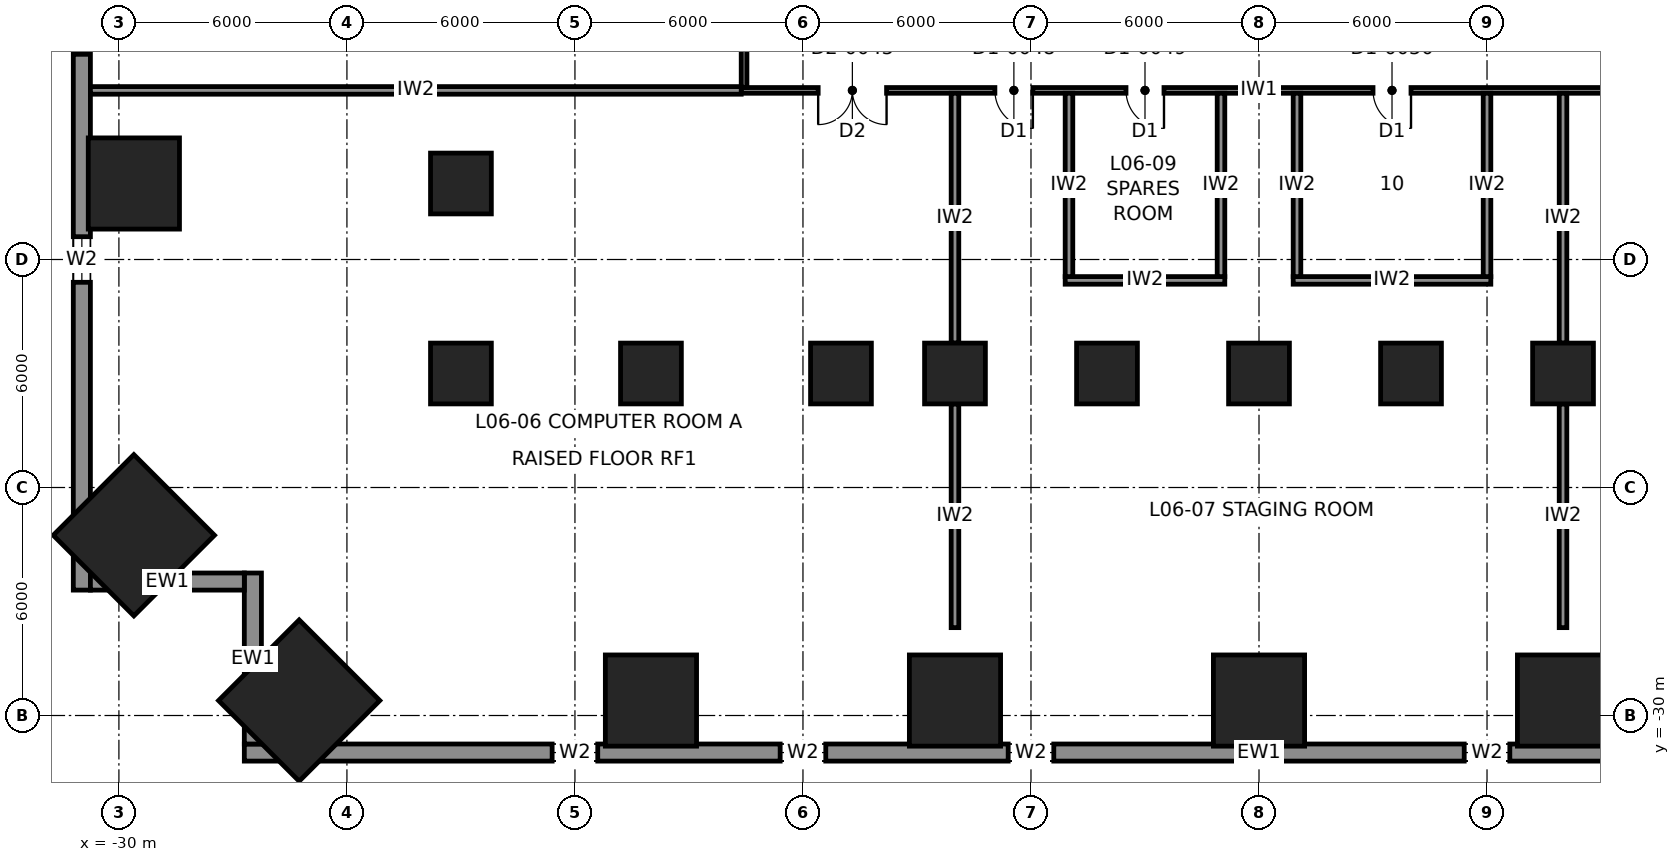
"""IFC4 building model, lengths in metres.
Left out: names, types, materials, properties, quantities, classifications, styles, units other than length and angle.
Written with IfcOpenShell. Run it as: python <this file> out.ifc"""

import sys

from ifc_helpers import new_model, si_unit, direction, frame, frame_2d, origin, origin_2d, place, context, subcontext, project, spatial, rectangle, extrude, element, fill, save


model = new_model("IFC4")
c1 = context("Model", 3, precision=1e-05, world=origin(), true_north=direction((0.0, 1.0)))
c2 = subcontext(c1, "Body", "Model", "MODEL_VIEW")
j1 = project(units=[si_unit("LENGTHUNIT", "METRE"), si_unit("PLANEANGLEUNIT", "RADIAN")], contexts=[c1])
p1 = place(None, origin())
s1 = spatial("IfcSite", under=j1, at=p1, CompositionType="ELEMENT")
p2 = place(p1, origin())
s2 = spatial("IfcBuilding", under=s1, at=p2, CompositionType="ELEMENT")
p3 = place(p2, frame((0.0, 0.0, 32.0)))
s3 = spatial("IfcBuildingStorey", under=s2, at=p3, CompositionType="ELEMENT", Elevation=32.0)
for number, where, z_axis, x_axis in (
    (1, (-25.256, -29.606, 0.0), (0.04, 0.04, 0.998), (-0.707, 0.707, 0.0)),
    (2, (-29.606, -25.256, 0.0), (0.04, 0.04, 0.998), (-0.707, 0.707, 0.0)),
):
    element("IfcColumn", number, at=place(p3, frame(where, z_axis=z_axis, x_axis=x_axis)), inside=s3, PredefinedType="COLUMN", context=c2, shape_type="SweptSolid", body=[
        extrude(rectangle(XDim=3.0, YDim=3.0, at=origin_2d()), origin(), (0.0, 0.0, 1.0), 5.509),
    ])
for number, where, z_axis, x_axis in (
    (3, (0.0, -29.606, 0.0), (0.0, 0.04, 0.999), (-1.0, 0.0, 0.0)),
    (4, (-8.0, -29.606, 0.0), (0.0, 0.04, 0.999), (-1.0, 0.0, 0.0)),
    (5, (8.0, -29.606, 0.0), (0.0, 0.04, 0.999), (-1.0, 0.0, 0.0)),
    (6, (-16.0, -29.606, 0.0), (0.0, 0.04, 0.999), (-1.0, 0.0, 0.0)),
    (7, (-29.606, -16.0, 0.0), (0.04, 0.0, 0.999), (0.0, 1.0, 0.0)),
):
    element("IfcColumn", number, at=place(p3, frame(where, z_axis=z_axis, x_axis=x_axis)), inside=s3, PredefinedType="COLUMN", context=c2, shape_type="SweptSolid", body=[
        extrude(rectangle(XDim=2.4, YDim=2.4, at=origin_2d()), origin(), (0.0, 0.0, 1.0), 5.504),
    ])
for number, where, z_axis, x_axis in (
    (8, (0.0, -21.0, 0.0), (0.0, 0.0, 1.0), (1.0, 0.0, 0.0)),
    (9, (-4.0, -21.0, 0.0), (0.0, 0.0, 1.0), (1.0, 0.0, 0.0)),
    (10, (4.0, -21.0, 0.0), (0.0, 0.0, 1.0), (1.0, 0.0, 0.0)),
    (11, (-8.0, -21.0, 0.0), (0.0, 0.0, 1.0), (1.0, 0.0, 0.0)),
    (12, (8.0, -21.0, 0.0), (0.0, 0.0, 1.0), (1.0, 0.0, 0.0)),
    (13, (-11.0, -21.0, 0.0), (0.0, 0.0, 1.0), (1.0, 0.0, 0.0)),
    (14, (-16.0, -21.0, 0.0), (0.0, 0.0, 1.0), (1.0, 0.0, 0.0)),
    (15, (-21.0, -16.0, 0.0), (0.0, 0.0, 1.0), (1.0, 0.0, 0.0)),
    (16, (-21.0, -21.0, 0.0), (0.0, 0.0, 1.0), (1.0, 0.0, 0.0)),
):
    element("IfcColumn", number, at=place(p3, frame(where, z_axis=z_axis, x_axis=x_axis)), inside=s3, PredefinedType="COLUMN", context=c2, shape_type="SweptSolid", body=[
        extrude(rectangle(XDim=1.6, YDim=1.6, at=origin_2d()), origin(), (0.0, 0.0, 1.0), 5.5),
    ])
p4 = place(p3, frame((-26.7, -30.975, 0.0), z_axis=(0.0, 0.0, 1.0), x_axis=(1.0, 0.0, 0.0)))
e17 = element("IfcWall", 17, at=p4, inside=s3, PredefinedType="SOLIDWALL", context=c2, shape_type="SweptSolid", body=[
    extrude(rectangle(XDim=53.4, YDim=0.45, at=frame_2d((26.7, 0.0))), origin(), (0.0, 0.0, 1.0), 5.3),
])
p5 = place(p4, frame((8.1, 0.0, 0.9)))
e18 = element("IfcOpeningElement", 18, at=p5, cuts=e17, PredefinedType="OPENING", context=c2, shape_type="SweptSolid", body=[
    extrude(rectangle(XDim=1.2, YDim=2.0, at=frame_2d((0.6, 1.0))), frame((0.0, 0.235, 0.0), z_axis=(0.0, -1.0, 0.0), x_axis=(1.0, 0.0, 0.0)), (0.0, 0.0, 1.0), 0.47),
])
p6 = place(p4, frame((14.1, 0.0, 0.9)))
e19 = element("IfcOpeningElement", 19, at=p6, cuts=e17, PredefinedType="OPENING", context=c2, shape_type="SweptSolid", body=[
    extrude(rectangle(XDim=1.2, YDim=2.0, at=frame_2d((0.6, 1.0))), frame((0.0, 0.235, 0.0), z_axis=(0.0, -1.0, 0.0), x_axis=(1.0, 0.0, 0.0)), (0.0, 0.0, 1.0), 0.47),
])
p7 = place(p4, frame((20.1, 0.0, 0.9)))
e20 = element("IfcOpeningElement", 20, at=p7, cuts=e17, PredefinedType="OPENING", context=c2, shape_type="SweptSolid", body=[
    extrude(rectangle(XDim=1.2, YDim=2.0, at=frame_2d((0.6, 1.0))), frame((0.0, 0.235, 0.0), z_axis=(0.0, -1.0, 0.0), x_axis=(1.0, 0.0, 0.0)), (0.0, 0.0, 1.0), 0.47),
])
p8 = place(p4, frame((32.1, 0.0, 0.9)))
e21 = element("IfcOpeningElement", 21, at=p8, cuts=e17, PredefinedType="OPENING", context=c2, shape_type="SweptSolid", body=[
    extrude(rectangle(XDim=1.2, YDim=2.0, at=frame_2d((0.6, 1.0))), frame((0.0, 0.235, 0.0), z_axis=(0.0, -1.0, 0.0), x_axis=(1.0, 0.0, 0.0)), (0.0, 0.0, 1.0), 0.47),
])
p9 = place(p4, frame((38.1, 0.0, 0.9)))
e22 = element("IfcOpeningElement", 22, at=p9, cuts=e17, PredefinedType="OPENING", context=c2, shape_type="SweptSolid", body=[
    extrude(rectangle(XDim=1.2, YDim=2.0, at=frame_2d((0.6, 1.0))), frame((0.0, 0.235, 0.0), z_axis=(0.0, -1.0, 0.0), x_axis=(1.0, 0.0, 0.0)), (0.0, 0.0, 1.0), 0.47),
])
p10 = place(p4, frame((44.1, 0.0, 0.9)))
e23 = element("IfcOpeningElement", 23, at=p10, cuts=e17, PredefinedType="OPENING", context=c2, shape_type="SweptSolid", body=[
    extrude(rectangle(XDim=1.2, YDim=2.0, at=frame_2d((0.6, 1.0))), frame((0.0, 0.235, 0.0), z_axis=(0.0, -1.0, 0.0), x_axis=(1.0, 0.0, 0.0)), (0.0, 0.0, 1.0), 0.47),
])
p11 = place(p3, frame((-30.975, 26.7, 0.0), z_axis=(0.0, 0.0, 1.0), x_axis=(0.0, -1.0, 0.0)))
e24 = element("IfcWall", 24, at=p11, inside=s3, PredefinedType="SOLIDWALL", context=c2, shape_type="SweptSolid", body=[
    extrude(rectangle(XDim=53.4, YDim=0.45, at=frame_2d((26.7, 0.0))), origin(), (0.0, 0.0, 1.0), 5.3),
])
p12 = place(p11, frame((8.1, 0.0, 0.9)))
e25 = element("IfcOpeningElement", 25, at=p12, cuts=e24, PredefinedType="OPENING", context=c2, shape_type="SweptSolid", body=[
    extrude(rectangle(XDim=1.2, YDim=2.0, at=frame_2d((0.6, 1.0))), frame((0.0, 0.235, 0.0), z_axis=(0.0, -1.0, 0.0), x_axis=(1.0, 0.0, 0.0)), (0.0, 0.0, 1.0), 0.47),
])
p13 = place(p11, frame((14.1, 0.0, 0.9)))
e26 = element("IfcOpeningElement", 26, at=p13, cuts=e24, PredefinedType="OPENING", context=c2, shape_type="SweptSolid", body=[
    extrude(rectangle(XDim=1.2, YDim=2.0, at=frame_2d((0.6, 1.0))), frame((0.0, 0.235, 0.0), z_axis=(0.0, -1.0, 0.0), x_axis=(1.0, 0.0, 0.0)), (0.0, 0.0, 1.0), 0.47),
])
p14 = place(p11, frame((20.1, 0.0, 0.9)))
e27 = element("IfcOpeningElement", 27, at=p14, cuts=e24, PredefinedType="OPENING", context=c2, shape_type="SweptSolid", body=[
    extrude(rectangle(XDim=1.2, YDim=2.0, at=frame_2d((0.6, 1.0))), frame((0.0, 0.235, 0.0), z_axis=(0.0, -1.0, 0.0), x_axis=(1.0, 0.0, 0.0)), (0.0, 0.0, 1.0), 0.47),
])
p15 = place(p11, frame((32.1, 0.0, 0.9)))
e28 = element("IfcOpeningElement", 28, at=p15, cuts=e24, PredefinedType="OPENING", context=c2, shape_type="SweptSolid", body=[
    extrude(rectangle(XDim=1.2, YDim=2.0, at=frame_2d((0.6, 1.0))), frame((0.0, 0.235, 0.0), z_axis=(0.0, -1.0, 0.0), x_axis=(1.0, 0.0, 0.0)), (0.0, 0.0, 1.0), 0.47),
])
p16 = place(p11, frame((38.1, 0.0, 0.9)))
e29 = element("IfcOpeningElement", 29, at=p16, cuts=e24, PredefinedType="OPENING", context=c2, shape_type="SweptSolid", body=[
    extrude(rectangle(XDim=1.2, YDim=2.0, at=frame_2d((0.6, 1.0))), frame((0.0, 0.235, 0.0), z_axis=(0.0, -1.0, 0.0), x_axis=(1.0, 0.0, 0.0)), (0.0, 0.0, 1.0), 0.47),
])
p17 = place(p11, frame((44.1, 0.0, 0.9)))
e30 = element("IfcOpeningElement", 30, at=p17, cuts=e24, PredefinedType="OPENING", context=c2, shape_type="SweptSolid", body=[
    extrude(rectangle(XDim=1.2, YDim=2.0, at=frame_2d((0.6, 1.0))), frame((0.0, 0.235, 0.0), z_axis=(0.0, -1.0, 0.0), x_axis=(1.0, 0.0, 0.0)), (0.0, 0.0, 1.0), 0.47),
])
p18 = place(p3, frame((-26.475, -26.25, 0.0), z_axis=(0.0, 0.0, 1.0), x_axis=(0.0, -1.0, 0.0)))
e31 = element("IfcWall", 31, at=p18, inside=s3, PredefinedType="SOLIDWALL", context=c2, shape_type="SweptSolid", body=[
    extrude(rectangle(XDim=4.5, YDim=0.45, at=frame_2d((2.25, 0.0))), origin(), (0.0, 0.0, 1.0), 5.3),
])
p19 = place(p3, frame((-26.7, -26.475, 0.0), z_axis=(0.0, 0.0, 1.0), x_axis=(-1.0, 0.0, 0.0)))
e32 = element("IfcWall", 32, at=p19, inside=s3, PredefinedType="SOLIDWALL", context=c2, shape_type="SweptSolid", body=[
    extrude(rectangle(XDim=4.05, YDim=0.45, at=frame_2d((2.025, 0.0))), origin(), (0.0, 0.0, 1.0), 5.3),
])
p20 = place(p3, frame((13.625, -13.55, 0.0), z_axis=(0.0, 0.0, 1.0), x_axis=(-1.0, 0.0, 0.0)))
e33 = element("IfcWall", 33, at=p20, inside=s3, PredefinedType="PARTITIONING", context=c2, shape_type="SweptSolid", body=[
    extrude(rectangle(XDim=27.25, YDim=0.15, at=frame_2d((13.625, 0.0))), origin(), (0.0, 0.0, 1.0), 5.3),
])
p21 = place(p20, frame((23.425, 0.0, 0.0)))
e34 = element("IfcOpeningElement", 34, at=p21, cuts=e33, PredefinedType="OPENING", context=c2, shape_type="SweptSolid", body=[
    extrude(rectangle(XDim=1.8, YDim=2.3, at=frame_2d((0.9, 1.15))), frame((0.0, 0.085, 0.0), z_axis=(0.0, -1.0, 0.0), x_axis=(1.0, 0.0, 0.0)), (0.0, 0.0, 1.0), 0.17),
])
p22 = place(p20, frame((19.575, 0.0, 0.0)))
e35 = element("IfcOpeningElement", 35, at=p22, cuts=e33, PredefinedType="OPENING", context=c2, shape_type="SweptSolid", body=[
    extrude(rectangle(XDim=1.0, YDim=2.3, at=frame_2d((0.5, 1.15))), frame((0.0, 0.085, 0.0), z_axis=(0.0, -1.0, 0.0), x_axis=(1.0, 0.0, 0.0)), (0.0, 0.0, 1.0), 0.17),
])
p23 = place(p20, frame((2.025, 0.0, 0.0)))
e36 = element("IfcOpeningElement", 36, at=p23, cuts=e33, PredefinedType="OPENING", context=c2, shape_type="SweptSolid", body=[
    extrude(rectangle(XDim=1.8, YDim=2.3, at=frame_2d((0.9, 1.15))), frame((0.0, 0.085, 0.0), z_axis=(0.0, -1.0, 0.0), x_axis=(1.0, 0.0, 0.0)), (0.0, 0.0, 1.0), 0.17),
])
p24 = place(p20, frame((16.125, 0.0, 0.0)))
e37 = element("IfcOpeningElement", 37, at=p24, cuts=e33, PredefinedType="OPENING", context=c2, shape_type="SweptSolid", body=[
    extrude(rectangle(XDim=1.0, YDim=2.3, at=frame_2d((0.5, 1.15))), frame((0.0, 0.085, 0.0), z_axis=(0.0, -1.0, 0.0), x_axis=(1.0, 0.0, 0.0)), (0.0, 0.0, 1.0), 0.17),
])
p25 = place(p20, frame((9.625, 0.0, 0.0)))
e38 = element("IfcOpeningElement", 38, at=p25, cuts=e33, PredefinedType="OPENING", context=c2, shape_type="SweptSolid", body=[
    extrude(rectangle(XDim=1.0, YDim=2.3, at=frame_2d((0.5, 1.15))), frame((0.0, 0.085, 0.0), z_axis=(0.0, -1.0, 0.0), x_axis=(1.0, 0.0, 0.0)), (0.0, 0.0, 1.0), 0.17),
])
p26 = place(p3, frame((-13.55, 13.475, 0.0), z_axis=(0.0, 0.0, 1.0), x_axis=(0.0, -1.0, 0.0)))
e39 = element("IfcWall", 39, at=p26, inside=s3, PredefinedType="PARTITIONING", context=c2, shape_type="SweptSolid", body=[
    extrude(rectangle(XDim=26.95, YDim=0.15, at=frame_2d((13.475, 0.0))), origin(), (0.0, 0.0, 1.0), 5.3),
])
p27 = place(p26, frame((19.675, 0.0, 0.0)))
e40 = element("IfcOpeningElement", 40, at=p27, cuts=e39, PredefinedType="OPENING", context=c2, shape_type="SweptSolid", body=[
    extrude(rectangle(XDim=1.0, YDim=2.3, at=frame_2d((0.5, 1.15))), frame((0.0, 0.085, 0.0), z_axis=(0.0, -1.0, 0.0), x_axis=(1.0, 0.0, 0.0)), (0.0, 0.0, 1.0), 0.17),
])
p28 = place(p26, frame((8.525, 0.0, 0.0)))
e41 = element("IfcOpeningElement", 41, at=p28, cuts=e39, PredefinedType="OPENING", context=c2, shape_type="SweptSolid", body=[
    extrude(rectangle(XDim=1.8, YDim=2.3, at=frame_2d((0.9, 1.15))), frame((0.0, 0.085, 0.0), z_axis=(0.0, -1.0, 0.0), x_axis=(1.0, 0.0, 0.0)), (0.0, 0.0, 1.0), 0.17),
])
p29 = place(p26, frame((3.225, 0.0, 0.0)))
e42 = element("IfcOpeningElement", 42, at=p29, cuts=e39, PredefinedType="OPENING", context=c2, shape_type="SweptSolid", body=[
    extrude(rectangle(XDim=1.0, YDim=2.3, at=frame_2d((0.5, 1.15))), frame((0.0, 0.085, 0.0), z_axis=(0.0, -1.0, 0.0), x_axis=(1.0, 0.0, 0.0)), (0.0, 0.0, 1.0), 0.17),
])
p30 = place(p3, frame((-13.625, -13.55, 0.0), z_axis=(0.0, 0.0, 1.0), x_axis=(-1.0, 0.0, 0.0)))
e43 = element("IfcWall", 43, at=p30, inside=s3, PredefinedType="PARTITIONING", context=c2, shape_type="SweptSolid", body=[
    extrude(rectangle(XDim=17.125, YDim=0.2, at=frame_2d((8.562, 0.0))), origin(), (0.0, 0.0, 1.0), 5.3),
])
p31 = place(p3, frame((-8.0, -13.625, 0.0), z_axis=(0.0, 0.0, 1.0), x_axis=(0.0, -1.0, 0.0)))
e44 = element("IfcWall", 44, at=p31, inside=s3, PredefinedType="PARTITIONING", context=c2, shape_type="SweptSolid", body=[
    extrude(rectangle(XDim=6.575, YDim=0.2, at=frame_2d((3.288, 0.0))), origin(), (0.0, 0.0, 1.0), 4.731),
])
p32 = place(p3, frame((-8.0, -21.8, 0.0), z_axis=(0.0, 0.0, 1.0), x_axis=(0.0, -1.0, 0.0)))
e45 = element("IfcWall", 45, at=p32, inside=s3, PredefinedType="PARTITIONING", context=c2, shape_type="SweptSolid", body=[
    extrude(rectangle(XDim=5.887, YDim=0.2, at=frame_2d((2.944, 0.0))), origin(), (0.0, 0.0, 1.0), 4.731),
])
p33 = place(p3, frame((8.0, -13.625, 0.0), z_axis=(0.0, 0.0, 1.0), x_axis=(0.0, -1.0, 0.0)))
e46 = element("IfcWall", 46, at=p33, inside=s3, PredefinedType="PARTITIONING", context=c2, shape_type="SweptSolid", body=[
    extrude(rectangle(XDim=6.575, YDim=0.2, at=frame_2d((3.288, 0.0))), origin(), (0.0, 0.0, 1.0), 4.731),
])
p34 = place(p3, frame((8.0, -21.8, 0.0), z_axis=(0.0, 0.0, 1.0), x_axis=(0.0, -1.0, 0.0)))
e47 = element("IfcWall", 47, at=p34, inside=s3, PredefinedType="PARTITIONING", context=c2, shape_type="SweptSolid", body=[
    extrude(rectangle(XDim=5.887, YDim=0.2, at=frame_2d((2.944, 0.0))), origin(), (0.0, 0.0, 1.0), 4.731),
])
p35 = place(p3, frame((-5.1, -18.55, 0.0), z_axis=(0.0, 0.0, 1.0), x_axis=(1.0, 0.0, 0.0)))
e48 = element("IfcWall", 48, at=p35, inside=s3, PredefinedType="PARTITIONING", context=c2, shape_type="SweptSolid", body=[
    extrude(rectangle(XDim=4.2, YDim=0.2, at=frame_2d((2.1, 0.0))), origin(), (0.0, 0.0, 1.0), 5.3),
])
for number, where, z_axis, x_axis in (
    (49, (-5.0, -13.625, 0.0), (0.0, 0.0, 1.0), (0.0, -1.0, 0.0)),
    (50, (-1.0, -13.625, 0.0), (0.0, 0.0, 1.0), (0.0, -1.0, 0.0)),
):
    element("IfcWall", number, at=place(p3, frame(where, z_axis=z_axis, x_axis=x_axis)), inside=s3, PredefinedType="PARTITIONING", context=c2, shape_type="SweptSolid", body=[
        extrude(rectangle(XDim=4.825, YDim=0.2, at=frame_2d((2.413, 0.0))), origin(), (0.0, 0.0, 1.0), 5.3),
    ])
p36 = place(p3, frame((0.9, -18.55, 0.0), z_axis=(0.0, 0.0, 1.0), x_axis=(1.0, 0.0, 0.0)))
e51 = element("IfcWall", 51, at=p36, inside=s3, PredefinedType="PARTITIONING", context=c2, shape_type="SweptSolid", body=[
    extrude(rectangle(XDim=5.2, YDim=0.2, at=frame_2d((2.6, 0.0))), origin(), (0.0, 0.0, 1.0), 5.3),
])
for number, where, z_axis, x_axis in (
    (52, (1.0, -13.625, 0.0), (0.0, 0.0, 1.0), (0.0, -1.0, 0.0)),
    (53, (6.0, -13.625, 0.0), (0.0, 0.0, 1.0), (0.0, -1.0, 0.0)),
):
    element("IfcWall", number, at=place(p3, frame(where, z_axis=z_axis, x_axis=x_axis)), inside=s3, PredefinedType="PARTITIONING", context=c2, shape_type="SweptSolid", body=[
        extrude(rectangle(XDim=4.825, YDim=0.2, at=frame_2d((2.413, 0.0))), origin(), (0.0, 0.0, 1.0), 5.3),
    ])
p37 = place(p5, origin())
e54 = element("IfcWindow", 54, at=p37, inside=s3, PartitioningType="SINGLE_PANEL", PredefinedType="WINDOW", context=c2, shape_type="SweptSolid", body=[
    extrude(rectangle(XDim=1.2, YDim=2.0, at=frame_2d((0.6, 1.0))), frame((0.0, 0.03, 0.0), z_axis=(0.0, -1.0, 0.0), x_axis=(1.0, 0.0, 0.0)), (0.0, 0.0, 1.0), 0.06),
])
fill(e18, e54)
p38 = place(p6, origin())
e55 = element("IfcWindow", 55, at=p38, inside=s3, PartitioningType="SINGLE_PANEL", PredefinedType="WINDOW", context=c2, shape_type="SweptSolid", body=[
    extrude(rectangle(XDim=1.2, YDim=2.0, at=frame_2d((0.6, 1.0))), frame((0.0, 0.03, 0.0), z_axis=(0.0, -1.0, 0.0), x_axis=(1.0, 0.0, 0.0)), (0.0, 0.0, 1.0), 0.06),
])
fill(e19, e55)
p39 = place(p7, origin())
e56 = element("IfcWindow", 56, at=p39, inside=s3, PartitioningType="SINGLE_PANEL", PredefinedType="WINDOW", context=c2, shape_type="SweptSolid", body=[
    extrude(rectangle(XDim=1.2, YDim=2.0, at=frame_2d((0.6, 1.0))), frame((0.0, 0.03, 0.0), z_axis=(0.0, -1.0, 0.0), x_axis=(1.0, 0.0, 0.0)), (0.0, 0.0, 1.0), 0.06),
])
fill(e20, e56)
p40 = place(p8, origin())
e57 = element("IfcWindow", 57, at=p40, inside=s3, PartitioningType="SINGLE_PANEL", PredefinedType="WINDOW", context=c2, shape_type="SweptSolid", body=[
    extrude(rectangle(XDim=1.2, YDim=2.0, at=frame_2d((0.6, 1.0))), frame((0.0, 0.03, 0.0), z_axis=(0.0, -1.0, 0.0), x_axis=(1.0, 0.0, 0.0)), (0.0, 0.0, 1.0), 0.06),
])
fill(e21, e57)
p41 = place(p16, origin())
e58 = element("IfcWindow", 58, at=p41, inside=s3, PartitioningType="SINGLE_PANEL", PredefinedType="WINDOW", context=c2, shape_type="SweptSolid", body=[
    extrude(rectangle(XDim=1.2, YDim=2.0, at=frame_2d((0.6, 1.0))), frame((0.0, 0.03, 0.0), z_axis=(0.0, -1.0, 0.0), x_axis=(1.0, 0.0, 0.0)), (0.0, 0.0, 1.0), 0.06),
])
fill(e29, e58)
p42 = place(p17, origin())
e59 = element("IfcWindow", 59, at=p42, inside=s3, PartitioningType="SINGLE_PANEL", PredefinedType="WINDOW", context=c2, shape_type="SweptSolid", body=[
    extrude(rectangle(XDim=1.2, YDim=2.0, at=frame_2d((0.6, 1.0))), frame((0.0, 0.03, 0.0), z_axis=(0.0, -1.0, 0.0), x_axis=(1.0, 0.0, 0.0)), (0.0, 0.0, 1.0), 0.06),
])
fill(e30, e59)
p43 = place(p21, origin())
e60 = element("IfcDoor", 60, at=p43, inside=s3, OperationType="DOUBLE_DOOR_DOUBLE_SWING", PredefinedType="DOOR", context=c2, shape_type="SweptSolid", body=[
    extrude(rectangle(XDim=1.8, YDim=2.3, at=frame_2d((0.9, 1.15))), frame((0.0, 0.025, 0.0), z_axis=(0.0, -1.0, 0.0), x_axis=(1.0, 0.0, 0.0)), (0.0, 0.0, 1.0), 0.05),
])
fill(e34, e60)
p44 = place(p22, origin())
e61 = element("IfcDoor", 61, at=p44, inside=s3, OperationType="SINGLE_SWING_LEFT", PredefinedType="DOOR", context=c2, shape_type="SweptSolid", body=[
    extrude(rectangle(XDim=1.0, YDim=2.3, at=frame_2d((0.5, 1.15))), frame((0.0, 0.025, 0.0), z_axis=(0.0, -1.0, 0.0), x_axis=(1.0, 0.0, 0.0)), (0.0, 0.0, 1.0), 0.05),
])
fill(e35, e61)
p45 = place(p24, origin())
e62 = element("IfcDoor", 62, at=p45, inside=s3, OperationType="SINGLE_SWING_LEFT", PredefinedType="DOOR", context=c2, shape_type="SweptSolid", body=[
    extrude(rectangle(XDim=1.0, YDim=2.3, at=frame_2d((0.5, 1.15))), frame((0.0, 0.025, 0.0), z_axis=(0.0, -1.0, 0.0), x_axis=(1.0, 0.0, 0.0)), (0.0, 0.0, 1.0), 0.05),
])
fill(e37, e62)
p46 = place(p25, origin())
e63 = element("IfcDoor", 63, at=p46, inside=s3, OperationType="SINGLE_SWING_LEFT", PredefinedType="DOOR", context=c2, shape_type="SweptSolid", body=[
    extrude(rectangle(XDim=1.0, YDim=2.3, at=frame_2d((0.5, 1.15))), frame((0.0, 0.025, 0.0), z_axis=(0.0, -1.0, 0.0), x_axis=(1.0, 0.0, 0.0)), (0.0, 0.0, 1.0), 0.05),
])
fill(e38, e63)
save(model, sys.argv[1])
